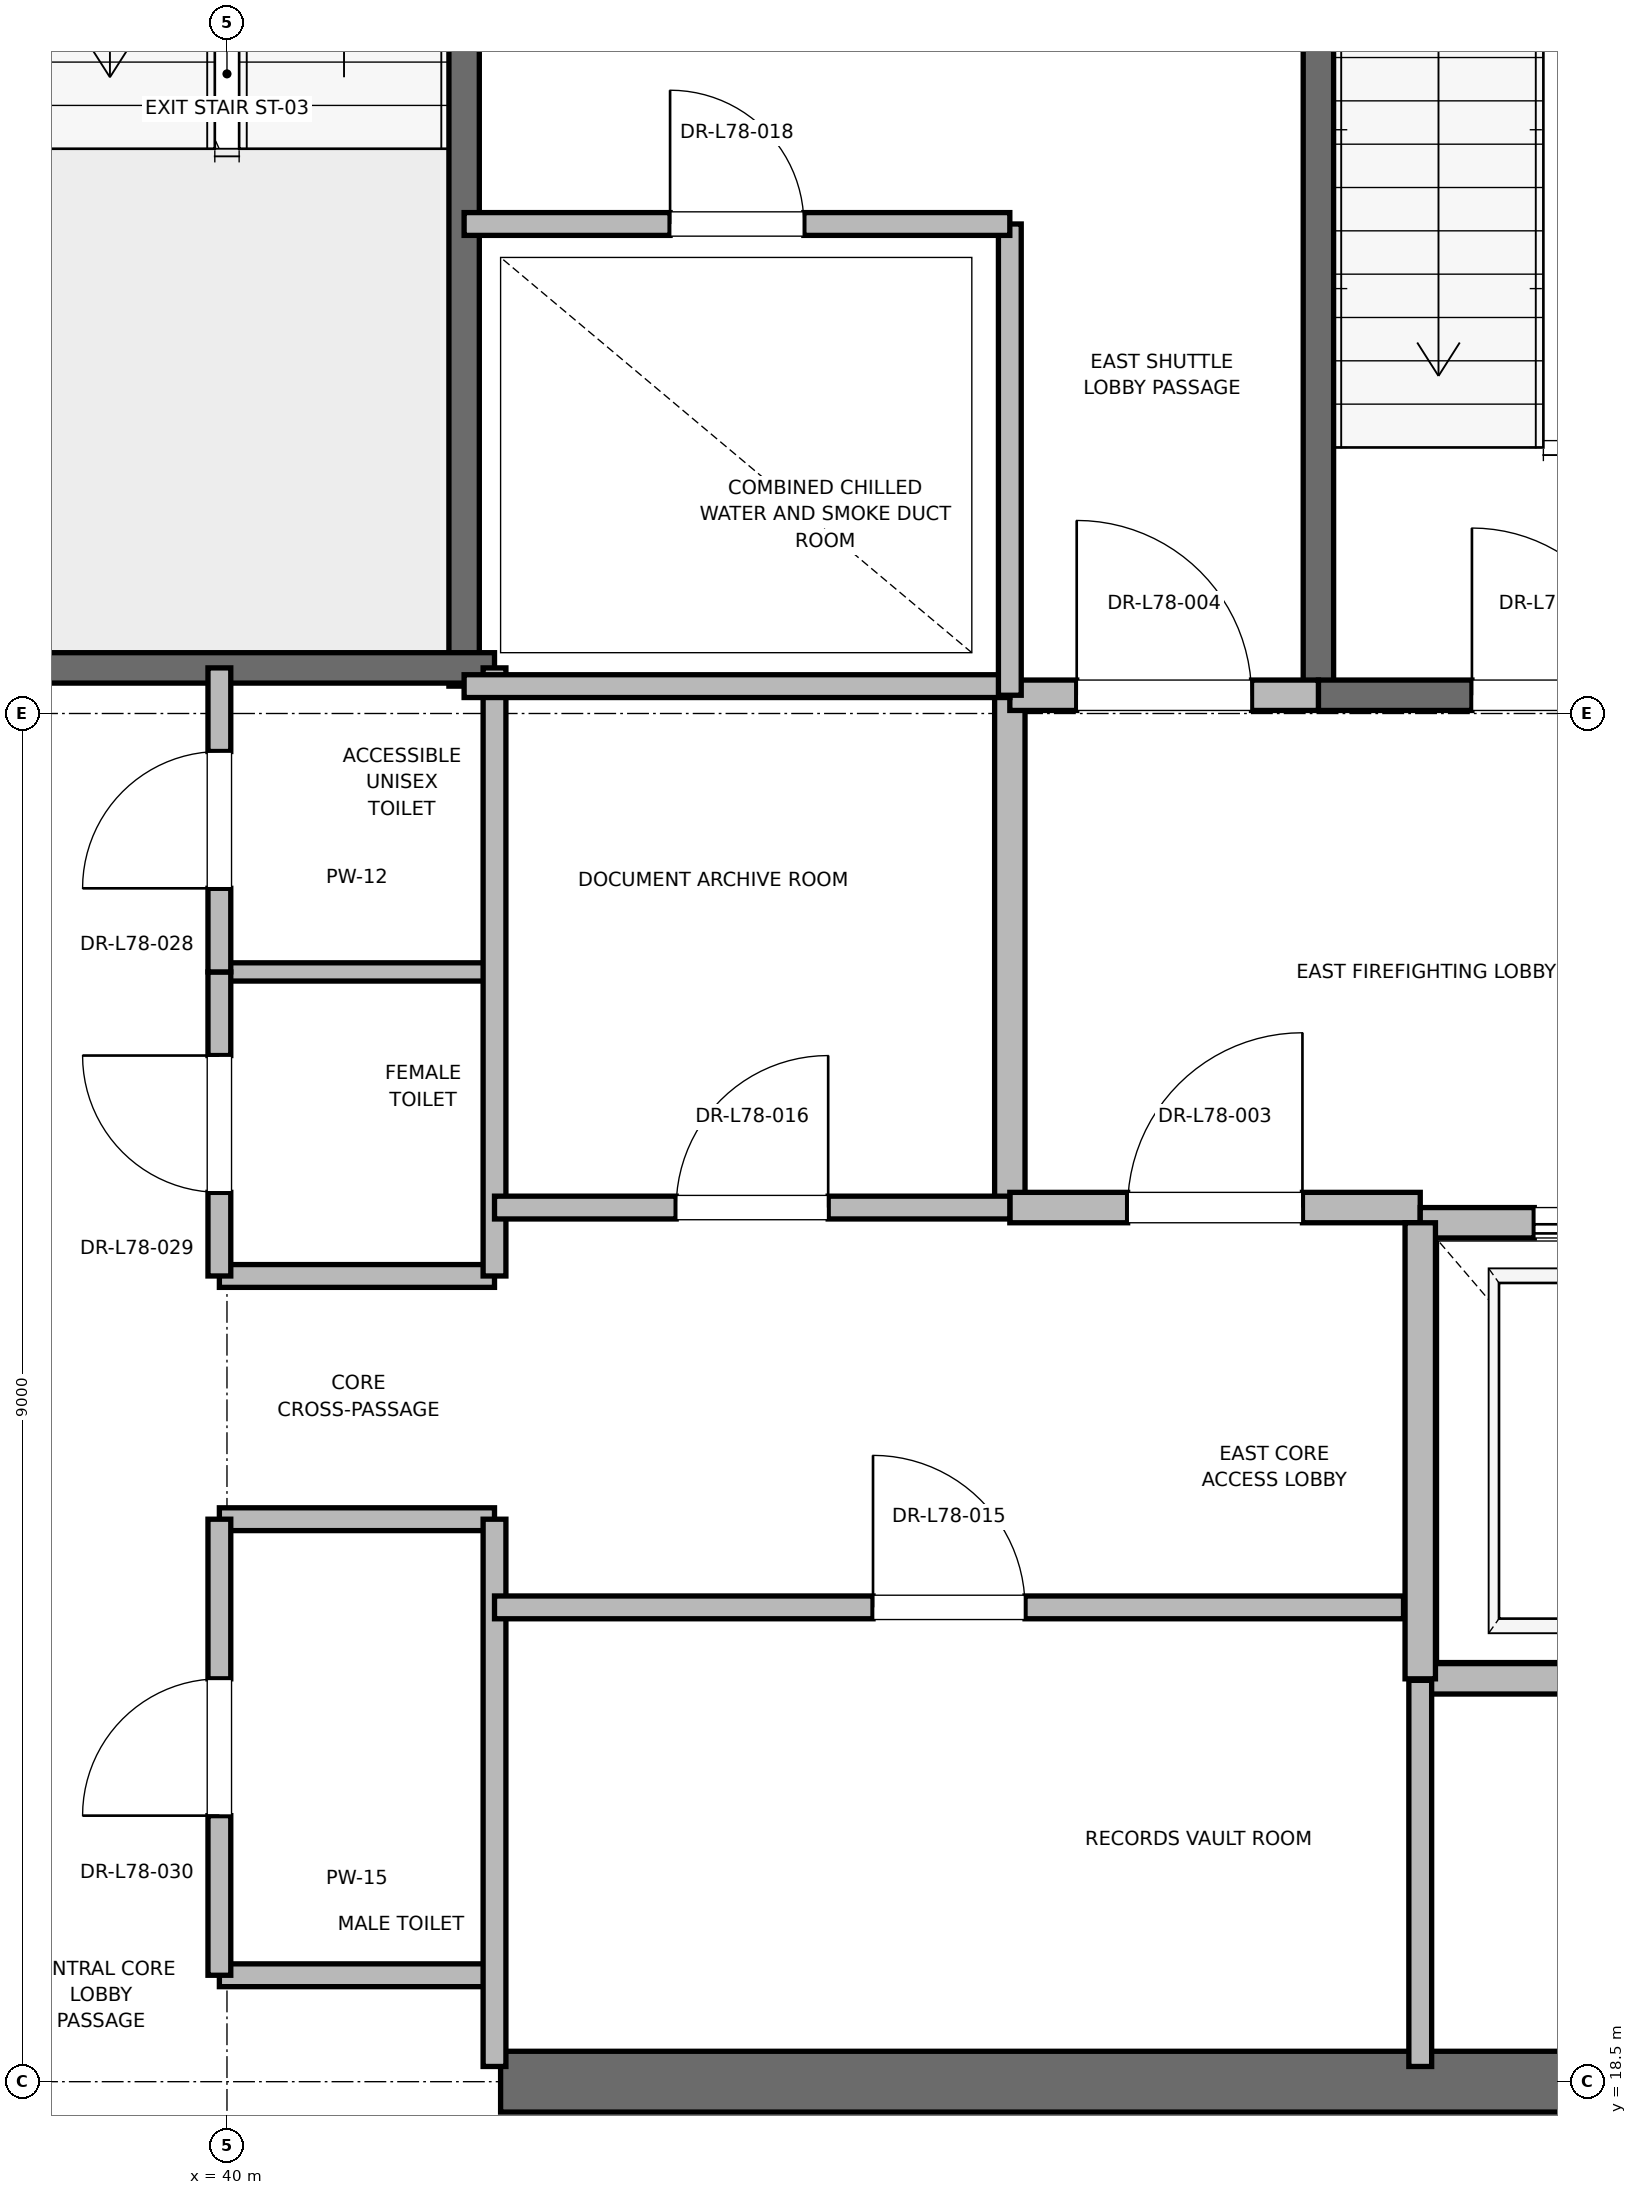
"""IFC4 building model, lengths in metres.
Left out: names, types, materials, properties, quantities, classifications, styles, units other than length and angle.
Written with IfcOpenShell. Run it as: python <this file> out.ifc"""

import sys

from ifc_helpers import new_model, si_unit, direction, frame, frame_2d, origin, place, context, subcontext, project, spatial, rectangle, extrude, element, fill, save


model = new_model("IFC4")
c1 = context("Model", 3, precision=1e-05, world=origin(), true_north=direction((0.0, 1.0)))
c2 = subcontext(c1, "Body", "Model", "MODEL_VIEW")
j1 = project(units=[si_unit("LENGTHUNIT", "METRE"), si_unit("PLANEANGLEUNIT", "RADIAN")], contexts=[c1])
p1 = place(None, origin())
s1 = spatial("IfcSite", under=j1, at=p1, CompositionType="ELEMENT")
p2 = place(p1, origin())
s2 = spatial("IfcBuilding", under=s1, at=p2, CompositionType="ELEMENT")
p3 = place(p2, frame((0.0, 0.0, 334.8)))
s3 = spatial("IfcBuildingStorey", under=s2, at=p3, CompositionType="ELEMENT", Elevation=334.8)
p4 = place(p3, frame((41.8, 18.5, 0.0), z_axis=(0.0, 0.0, 1.0), x_axis=(1.0, 0.0, 0.0)))
e1 = element("IfcWall", 1, at=p4, inside=s3, PredefinedType="SHEAR", context=c2, shape_type="SweptSolid", body=[
    extrude(rectangle(XDim=9.2, YDim=0.4, at=frame_2d((4.6, 0.0))), origin(), (0.0, 0.0, 1.0), 3.785),
])
p5 = place(p3, frame((47.18, 27.62, 0.0), z_axis=(0.0, 0.0, 1.0), x_axis=(0.0, 1.0, 0.0)))
e2 = element("IfcWall", 2, at=p5, inside=s3, PredefinedType="SOLIDWALL", context=c2, shape_type="SweptSolid", body=[
    extrude(rectangle(XDim=8.18, YDim=0.2, at=frame_2d((4.09, 0.0))), origin(), (0.0, 0.0, 1.0), 3.785),
])
p6 = place(p3, frame((47.18, 27.62, 0.0), z_axis=(0.0, 0.0, 1.0), x_axis=(1.0, 0.0, 0.0)))
e3 = element("IfcWall", 3, at=p6, inside=s3, PredefinedType="SOLIDWALL", context=c2, shape_type="SweptSolid", body=[
    extrude(rectangle(XDim=3.12, YDim=0.2, at=frame_2d((1.56, 0.0))), origin(), (0.0, 0.0, 1.0), 3.785),
])
p7 = place(p6, frame((1.01, 0.0, 0.0)))
e4 = element("IfcOpeningElement", 4, at=p7, cuts=e3, PredefinedType="OPENING", context=c2, shape_type="SweptSolid", body=[
    extrude(rectangle(XDim=1.1, YDim=2.15, at=frame_2d((0.55, 1.075))), frame((0.0, 0.1, 0.0), z_axis=(0.0, -1.0, 0.0), x_axis=(1.0, 0.0, 0.0)), (0.0, 0.0, 1.0), 0.2),
])
p8 = place(p3, frame((41.56, 27.68, 0.0), z_axis=(0.0, 0.0, 1.0), x_axis=(0.0, 1.0, 0.0)))
e5 = element("IfcWall", 5, at=p8, inside=s3, PredefinedType="SOLIDWALL", context=c2, shape_type="SweptSolid", body=[
    extrude(rectangle(XDim=8.57, YDim=0.2, at=frame_2d((4.285, 0.0))), origin(), (0.0, 0.0, 1.0), 3.785),
])
p9 = place(p3, frame((38.44, 27.8, 0.0), z_axis=(0.0, 0.0, 1.0), x_axis=(1.0, 0.0, 0.0)))
e6 = element("IfcWall", 6, at=p9, inside=s3, PredefinedType="SOLIDWALL", context=c2, shape_type="SweptSolid", body=[
    extrude(rectangle(XDim=3.32, YDim=0.2, at=frame_2d((1.66, 0.0))), origin(), (0.0, 0.0, 1.0), 3.785),
])
p10 = place(p3, frame((45.15, 24.25, 0.0), z_axis=(0.0, 0.0, 1.0), x_axis=(0.0, 1.0, 0.0)))
e7 = element("IfcWall", 7, at=p10, inside=s3, PredefinedType="PARTITIONING", context=c2, shape_type="SweptSolid", body=[
    extrude(rectangle(XDim=3.37, YDim=0.2, at=frame_2d((1.685, 0.0))), origin(), (0.0, 0.0, 1.0), 3.785),
])
p11 = place(p3, frame((45.15, 24.25, 0.0), z_axis=(0.0, 0.0, 1.0), x_axis=(1.0, 0.0, 0.0)))
e8 = element("IfcWall", 8, at=p11, inside=s3, PredefinedType="PARTITIONING", context=c2, shape_type="SweptSolid", body=[
    extrude(rectangle(XDim=2.7, YDim=0.2, at=frame_2d((1.35, 0.0))), origin(), (0.0, 0.0, 1.0), 3.785),
])
p12 = place(p11, frame((0.775, 0.0, 0.0)))
e9 = element("IfcOpeningElement", 9, at=p12, cuts=e8, PredefinedType="OPENING", context=c2, shape_type="SweptSolid", body=[
    extrude(rectangle(XDim=1.15, YDim=2.2, at=frame_2d((0.575, 1.1))), frame((0.0, 0.1, 0.0), z_axis=(0.0, -1.0, 0.0), x_axis=(1.0, 0.0, 0.0)), (0.0, 0.0, 1.0), 0.2),
])
p13 = place(p3, frame((45.15, 27.62, 0.0), z_axis=(0.0, 0.0, 1.0), x_axis=(1.0, 0.0, 0.0)))
e10 = element("IfcWall", 10, at=p13, inside=s3, PredefinedType="PARTITIONING", context=c2, shape_type="SweptSolid", body=[
    extrude(rectangle(XDim=2.03, YDim=0.2, at=frame_2d((1.015, 0.0))), origin(), (0.0, 0.0, 1.0), 3.785),
])
p14 = place(p13, frame((0.44, 0.0, 0.0)))
e11 = element("IfcOpeningElement", 11, at=p14, cuts=e10, PredefinedType="OPENING", context=c2, shape_type="SweptSolid", body=[
    extrude(rectangle(XDim=1.15, YDim=2.2, at=frame_2d((0.575, 1.1))), frame((0.0, 0.1, 0.0), z_axis=(0.0, -1.0, 0.0), x_axis=(1.0, 0.0, 0.0)), (0.0, 0.0, 1.0), 0.2),
])
p15 = place(p3, frame((47.85, 21.15, 0.0), z_axis=(0.0, 0.0, 1.0), x_axis=(1.0, 0.0, 0.0)))
e12 = element("IfcWall", 12, at=p15, inside=s3, PredefinedType="SOLIDWALL", context=c2, shape_type="SweptSolid", body=[
    extrude(rectangle(XDim=2.6, YDim=0.2, at=frame_2d((1.3, 0.0))), origin(), (0.0, 0.0, 1.0), 3.785),
])
p16 = place(p3, frame((50.45, 24.15, 0.0), z_axis=(0.0, 0.0, 1.0), x_axis=(-1.0, 0.0, 0.0)))
e13 = element("IfcWall", 13, at=p16, inside=s3, PredefinedType="SOLIDWALL", context=c2, shape_type="SweptSolid", body=[
    extrude(rectangle(XDim=2.6, YDim=0.2, at=frame_2d((1.3, 0.0))), origin(), (0.0, 0.0, 1.0), 2.865),
])
p17 = place(p16, frame((0.75, 0.0, 0.0)))
e14 = element("IfcOpeningElement", 14, at=p17, cuts=e13, PredefinedType="OPENING", context=c2, shape_type="SweptSolid", body=[
    extrude(rectangle(XDim=1.1, YDim=2.2, at=frame_2d((0.55, 1.1))), frame((0.0, 0.1, 0.0), z_axis=(0.0, -1.0, 0.0), x_axis=(1.0, 0.0, 0.0)), (0.0, 0.0, 1.0), 0.2),
])
p18 = place(p3, frame((47.85, 24.15, 0.0), z_axis=(0.0, 0.0, 1.0), x_axis=(0.0, -1.0, 0.0)))
e15 = element("IfcWall", 15, at=p18, inside=s3, PredefinedType="SOLIDWALL", context=c2, shape_type="SweptSolid", body=[
    extrude(rectangle(XDim=3.0, YDim=0.2, at=frame_2d((1.5, 0.0))), origin(), (0.0, 0.0, 1.0), 3.785),
])
for number, where, z_axis, x_axis in (
    (16, (39.95, 19.2, 0.0), (0.0, 0.0, 1.0), (1.0, 0.0, 0.0)),
    (17, (39.95, 22.2, 0.0), (0.0, 0.0, 1.0), (1.0, 0.0, 0.0)),
    (18, (39.95, 23.8, 0.0), (0.0, 0.0, 1.0), (1.0, 0.0, 0.0)),
):
    element("IfcWall", number, at=place(p3, frame(where, z_axis=z_axis, x_axis=x_axis)), inside=s3, PredefinedType="PARTITIONING", context=c2, shape_type="SweptSolid", body=[
        extrude(rectangle(XDim=1.81, YDim=0.15, at=frame_2d((0.905, 0.0))), origin(), (0.0, 0.0, 1.0), 2.85),
    ])
p19 = place(p3, frame((39.95, 25.8, 0.0), z_axis=(0.0, 0.0, 1.0), x_axis=(1.0, 0.0, 0.0)))
e19 = element("IfcWall", 19, at=p19, inside=s3, PredefinedType="PARTITIONING", context=c2, shape_type="SweptSolid", body=[
    extrude(rectangle(XDim=1.81, YDim=0.12, at=frame_2d((0.905, 0.0))), origin(), (0.0, 0.0, 1.0), 2.85),
])
p20 = place(p3, frame((41.76, 18.6, 0.0), z_axis=(0.0, 0.0, 1.0), x_axis=(0.0, 1.0, 0.0)))
e20 = element("IfcWall", 20, at=p20, inside=s3, PredefinedType="PARTITIONING", context=c2, shape_type="SweptSolid", body=[
    extrude(rectangle(XDim=3.6, YDim=0.15, at=frame_2d((1.8, 0.0))), origin(), (0.0, 0.0, 1.0), 2.85),
])
p21 = place(p3, frame((41.76, 23.8, 0.0), z_axis=(0.0, 0.0, 1.0), x_axis=(0.0, 1.0, 0.0)))
e21 = element("IfcWall", 21, at=p21, inside=s3, PredefinedType="PARTITIONING", context=c2, shape_type="SweptSolid", body=[
    extrude(rectangle(XDim=4.0, YDim=0.15, at=frame_2d((2.0, 0.0))), origin(), (0.0, 0.0, 1.0), 2.85),
])
p22 = place(p3, frame((39.95, 19.2, 0.0), z_axis=(0.0, 0.0, 1.0), x_axis=(0.0, 1.0, 0.0)))
e22 = element("IfcWall", 22, at=p22, inside=s3, PredefinedType="PARTITIONING", context=c2, shape_type="SweptSolid", body=[
    extrude(rectangle(XDim=3.0, YDim=0.15, at=frame_2d((1.5, 0.0))), origin(), (0.0, 0.0, 1.0), 2.85),
])
p23 = place(p22, frame((1.05, 0.0, 0.0)))
e23 = element("IfcOpeningElement", 23, at=p23, cuts=e22, PredefinedType="OPENING", context=c2, shape_type="SweptSolid", body=[
    extrude(rectangle(XDim=0.9, YDim=2.1, at=frame_2d((0.45, 1.05))), frame((0.0, 0.075, 0.0), z_axis=(0.0, -1.0, 0.0), x_axis=(1.0, 0.0, 0.0)), (0.0, 0.0, 1.0), 0.15),
])
p24 = place(p3, frame((39.95, 23.8, 0.0), z_axis=(0.0, 0.0, 1.0), x_axis=(0.0, 1.0, 0.0)))
e24 = element("IfcWall", 24, at=p24, inside=s3, PredefinedType="PARTITIONING", context=c2, shape_type="SweptSolid", body=[
    extrude(rectangle(XDim=2.0, YDim=0.15, at=frame_2d((1.0, 0.0))), origin(), (0.0, 0.0, 1.0), 2.85),
])
p25 = place(p24, frame((0.55, 0.0, 0.0)))
e25 = element("IfcOpeningElement", 25, at=p25, cuts=e24, PredefinedType="OPENING", context=c2, shape_type="SweptSolid", body=[
    extrude(rectangle(XDim=0.9, YDim=2.1, at=frame_2d((0.45, 1.05))), frame((0.0, 0.075, 0.0), z_axis=(0.0, -1.0, 0.0), x_axis=(1.0, 0.0, 0.0)), (0.0, 0.0, 1.0), 0.15),
])
p26 = place(p3, frame((39.95, 25.8, 0.0), z_axis=(0.0, 0.0, 1.0), x_axis=(0.0, 1.0, 0.0)))
e26 = element("IfcWall", 26, at=p26, inside=s3, PredefinedType="PARTITIONING", context=c2, shape_type="SweptSolid", body=[
    extrude(rectangle(XDim=2.0, YDim=0.15, at=frame_2d((1.0, 0.0))), origin(), (0.0, 0.0, 1.0), 2.85),
])
p27 = place(p26, frame((0.55, 0.0, 0.0)))
e27 = element("IfcOpeningElement", 27, at=p27, cuts=e26, PredefinedType="OPENING", context=c2, shape_type="SweptSolid", body=[
    extrude(rectangle(XDim=0.9, YDim=2.1, at=frame_2d((0.45, 1.05))), frame((0.0, 0.075, 0.0), z_axis=(0.0, -1.0, 0.0), x_axis=(1.0, 0.0, 0.0)), (0.0, 0.0, 1.0), 0.15),
])
p28 = place(p3, frame((41.56, 27.68, 0.0), z_axis=(0.0, 0.0, 1.0), x_axis=(1.0, 0.0, 0.0)))
e28 = element("IfcWall", 28, at=p28, inside=s3, PredefinedType="PARTITIONING", context=c2, shape_type="SweptSolid", body=[
    extrude(rectangle(XDim=3.59, YDim=0.15, at=frame_2d((1.795, 0.0))), origin(), (0.0, 0.0, 1.0), 2.85),
])
p29 = place(p3, frame((47.85, 18.6, 0.0), z_axis=(0.0, 0.0, 1.0), x_axis=(0.0, 1.0, 0.0)))
e29 = element("IfcWall", 29, at=p29, inside=s3, PredefinedType="PARTITIONING", context=c2, shape_type="SweptSolid", body=[
    extrude(rectangle(XDim=2.54, YDim=0.15, at=frame_2d((1.27, 0.0))), origin(), (0.0, 0.0, 1.0), 2.85),
])
p30 = place(p3, frame((41.76, 21.62, 0.0), z_axis=(0.0, 0.0, 1.0), x_axis=(1.0, 0.0, 0.0)))
e30 = element("IfcWall", 30, at=p30, inside=s3, PredefinedType="PARTITIONING", context=c2, shape_type="SweptSolid", body=[
    extrude(rectangle(XDim=5.98, YDim=0.15, at=frame_2d((2.99, 0.0))), origin(), (0.0, 0.0, 1.0), 2.85),
])
p31 = place(p30, frame((2.49, 0.0, 0.0)))
e31 = element("IfcOpeningElement", 31, at=p31, cuts=e30, PredefinedType="OPENING", context=c2, shape_type="SweptSolid", body=[
    extrude(rectangle(XDim=1.0, YDim=2.15, at=frame_2d((0.5, 1.075))), frame((0.0, 0.075, 0.0), z_axis=(0.0, -1.0, 0.0), x_axis=(1.0, 0.0, 0.0)), (0.0, 0.0, 1.0), 0.15),
])
p32 = place(p3, frame((41.76, 24.25, 0.0), z_axis=(0.0, 0.0, 1.0), x_axis=(1.0, 0.0, 0.0)))
e32 = element("IfcWall", 32, at=p32, inside=s3, PredefinedType="PARTITIONING", context=c2, shape_type="SweptSolid", body=[
    extrude(rectangle(XDim=3.39, YDim=0.15, at=frame_2d((1.695, 0.0))), origin(), (0.0, 0.0, 1.0), 2.85),
])
p33 = place(p32, frame((1.195, 0.0, 0.0)))
e33 = element("IfcOpeningElement", 33, at=p33, cuts=e32, PredefinedType="OPENING", context=c2, shape_type="SweptSolid", body=[
    extrude(rectangle(XDim=1.0, YDim=2.15, at=frame_2d((0.5, 1.075))), frame((0.0, 0.075, 0.0), z_axis=(0.0, -1.0, 0.0), x_axis=(1.0, 0.0, 0.0)), (0.0, 0.0, 1.0), 0.15),
])
p34 = place(p3, frame((45.15, 27.62, 0.0), z_axis=(0.0, 0.0, 1.0), x_axis=(0.0, 1.0, 0.0)))
e34 = element("IfcWall", 34, at=p34, inside=s3, PredefinedType="PARTITIONING", context=c2, shape_type="SweptSolid", body=[
    extrude(rectangle(XDim=3.1, YDim=0.15, at=frame_2d((1.55, 0.0))), origin(), (0.0, 0.0, 1.0), 2.85),
])
p35 = place(p3, frame((41.56, 30.72, 0.0), z_axis=(0.0, 0.0, 1.0), x_axis=(1.0, 0.0, 0.0)))
e35 = element("IfcWall", 35, at=p35, inside=s3, PredefinedType="PARTITIONING", context=c2, shape_type="SweptSolid", body=[
    extrude(rectangle(XDim=3.59, YDim=0.15, at=frame_2d((1.795, 0.0))), origin(), (0.0, 0.0, 1.0), 2.85),
])
p36 = place(p35, frame((1.355, 0.0, 0.0)))
e36 = element("IfcOpeningElement", 36, at=p36, cuts=e35, PredefinedType="OPENING", context=c2, shape_type="SweptSolid", body=[
    extrude(rectangle(XDim=0.88, YDim=2.1, at=frame_2d((0.44, 1.05))), frame((0.0, 0.075, 0.0), z_axis=(0.0, -1.0, 0.0), x_axis=(1.0, 0.0, 0.0)), (0.0, 0.0, 1.0), 0.15),
])
p37 = place(p7, origin())
e37 = element("IfcDoor", 37, at=p37, inside=s3, OperationType="SINGLE_SWING_LEFT", PredefinedType="DOOR", context=c2, shape_type="SweptSolid", body=[
    extrude(rectangle(XDim=1.1, YDim=2.15, at=frame_2d((0.55, 1.075))), frame((0.0, 0.025, 0.0), z_axis=(0.0, -1.0, 0.0), x_axis=(1.0, 0.0, 0.0)), (0.0, 0.0, 1.0), 0.05),
])
fill(e4, e37)
p38 = place(p12, origin())
e38 = element("IfcDoor", 38, at=p38, inside=s3, OperationType="SINGLE_SWING_RIGHT", PredefinedType="DOOR", context=c2, shape_type="SweptSolid", body=[
    extrude(rectangle(XDim=1.15, YDim=2.2, at=frame_2d((0.575, 1.1))), frame((0.0, 0.025, 0.0), z_axis=(0.0, -1.0, 0.0), x_axis=(1.0, 0.0, 0.0)), (0.0, 0.0, 1.0), 0.05),
])
fill(e9, e38)
p39 = place(p14, origin())
e39 = element("IfcDoor", 39, at=p39, inside=s3, OperationType="SINGLE_SWING_LEFT", PredefinedType="DOOR", context=c2, shape_type="SweptSolid", body=[
    extrude(rectangle(XDim=1.15, YDim=2.2, at=frame_2d((0.575, 1.1))), frame((0.0, 0.025, 0.0), z_axis=(0.0, -1.0, 0.0), x_axis=(1.0, 0.0, 0.0)), (0.0, 0.0, 1.0), 0.05),
])
fill(e11, e39)
p40 = place(p17, origin())
e40 = element("IfcDoor", 40, at=p40, inside=s3, OperationType="SLIDING_TO_RIGHT", PredefinedType="DOOR", context=c2, shape_type="SweptSolid", body=[
    extrude(rectangle(XDim=1.1, YDim=2.2, at=frame_2d((0.55, 1.1))), frame((0.0, 0.025, 0.0), z_axis=(0.0, -1.0, 0.0), x_axis=(1.0, 0.0, 0.0)), (0.0, 0.0, 1.0), 0.05),
])
fill(e14, e40)
p41 = place(p23, origin())
e41 = element("IfcDoor", 41, at=p41, inside=s3, OperationType="SINGLE_SWING_LEFT", PredefinedType="DOOR", context=c2, shape_type="SweptSolid", body=[
    extrude(rectangle(XDim=0.9, YDim=2.1, at=frame_2d((0.45, 1.05))), frame((0.0, 0.025, 0.0), z_axis=(0.0, -1.0, 0.0), x_axis=(1.0, 0.0, 0.0)), (0.0, 0.0, 1.0), 0.05),
])
fill(e23, e41)
p42 = place(p25, origin())
e42 = element("IfcDoor", 42, at=p42, inside=s3, OperationType="SINGLE_SWING_RIGHT", PredefinedType="DOOR", context=c2, shape_type="SweptSolid", body=[
    extrude(rectangle(XDim=0.9, YDim=2.1, at=frame_2d((0.45, 1.05))), frame((0.0, 0.025, 0.0), z_axis=(0.0, -1.0, 0.0), x_axis=(1.0, 0.0, 0.0)), (0.0, 0.0, 1.0), 0.05),
])
fill(e25, e42)
p43 = place(p27, origin())
e43 = element("IfcDoor", 43, at=p43, inside=s3, OperationType="SINGLE_SWING_LEFT", PredefinedType="DOOR", context=c2, shape_type="SweptSolid", body=[
    extrude(rectangle(XDim=0.9, YDim=2.1, at=frame_2d((0.45, 1.05))), frame((0.0, 0.025, 0.0), z_axis=(0.0, -1.0, 0.0), x_axis=(1.0, 0.0, 0.0)), (0.0, 0.0, 1.0), 0.05),
])
fill(e27, e43)
p44 = place(p31, origin())
e44 = element("IfcDoor", 44, at=p44, inside=s3, OperationType="SINGLE_SWING_LEFT", PredefinedType="DOOR", context=c2, shape_type="SweptSolid", body=[
    extrude(rectangle(XDim=1.0, YDim=2.15, at=frame_2d((0.5, 1.075))), frame((0.0, 0.025, 0.0), z_axis=(0.0, -1.0, 0.0), x_axis=(1.0, 0.0, 0.0)), (0.0, 0.0, 1.0), 0.05),
])
fill(e31, e44)
p45 = place(p33, origin())
e45 = element("IfcDoor", 45, at=p45, inside=s3, OperationType="SINGLE_SWING_RIGHT", PredefinedType="DOOR", context=c2, shape_type="SweptSolid", body=[
    extrude(rectangle(XDim=1.0, YDim=2.15, at=frame_2d((0.5, 1.075))), frame((0.0, 0.025, 0.0), z_axis=(0.0, -1.0, 0.0), x_axis=(1.0, 0.0, 0.0)), (0.0, 0.0, 1.0), 0.05),
])
fill(e33, e45)
p46 = place(p36, origin())
e46 = element("IfcDoor", 46, at=p46, inside=s3, OperationType="SINGLE_SWING_LEFT", PredefinedType="DOOR", context=c2, shape_type="SweptSolid", body=[
    extrude(rectangle(XDim=0.88, YDim=2.1, at=frame_2d((0.44, 1.05))), frame((0.0, 0.025, 0.0), z_axis=(0.0, -1.0, 0.0), x_axis=(1.0, 0.0, 0.0)), (0.0, 0.0, 1.0), 0.05),
])
fill(e36, e46)
save(model, sys.argv[1])
